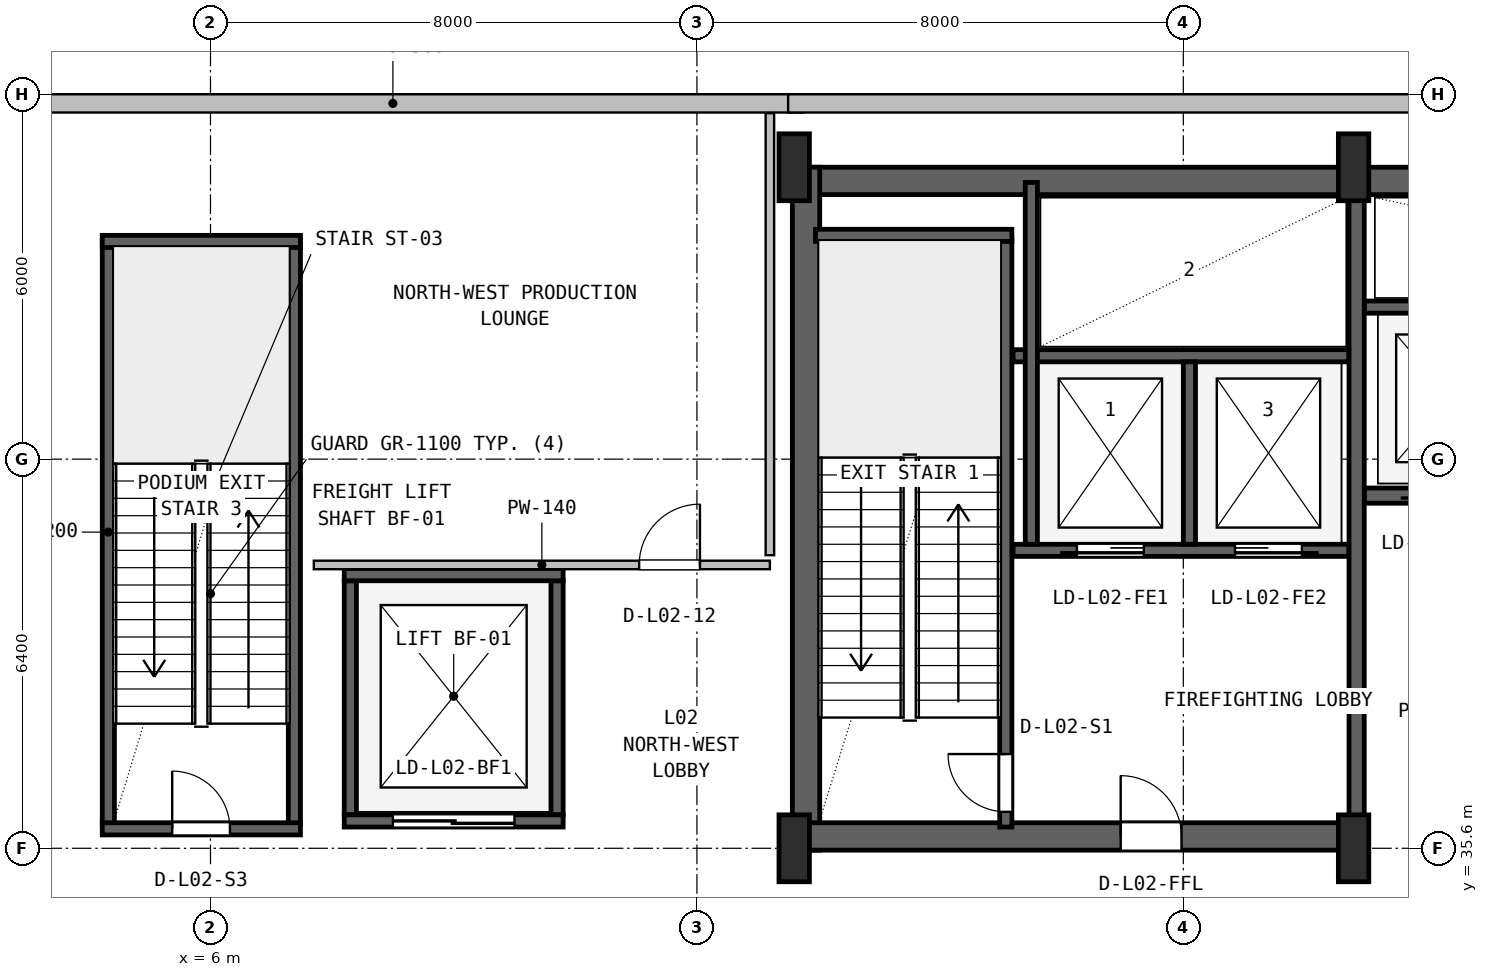
"""IFC4 building model, lengths in metres.
Left out: names, types, materials, properties, quantities, classifications, styles, units other than length and angle.
Written with IfcOpenShell. Run it as: python <this file> out.ifc"""

import sys

from ifc_helpers import new_model, si_unit, direction, frame, frame_2d, origin, origin_2d, place, context, subcontext, project, spatial, rectangle, i_section, extrude, source, transform, mapped, element, fill, save


model = new_model("IFC4")
c1 = context("Model", 3, precision=1e-05, world=origin(), true_north=direction((0.0, 1.0)))
c2 = subcontext(c1, "Body", "Model", "MODEL_VIEW")
j1 = project(units=[si_unit("LENGTHUNIT", "METRE"), si_unit("PLANEANGLEUNIT", "RADIAN")], contexts=[c1])
p1 = place(None, origin())
s1 = spatial("IfcSite", under=j1, at=p1, CompositionType="ELEMENT")
p2 = place(p1, origin())
s2 = spatial("IfcBuilding", under=s1, at=p2, CompositionType="ELEMENT")
p3 = place(p2, frame((0.0, 0.0, 11.4)))
s3 = spatial("IfcBuildingStorey", under=s2, at=p3, CompositionType="ELEMENT", Elevation=11.4)
p4 = place(p3, frame((15.6, 46.575, 0.0), z_axis=(0.0, 0.0, 1.0), x_axis=(1.0, 0.0, 0.0)))
e1 = element("IfcWall", 1, at=p4, inside=s3, PredefinedType="SHEAR", context=c2, shape_type="SweptSolid", body=[
    extrude(rectangle(XDim=36.8, YDim=0.45, at=frame_2d((18.4, 0.0))), origin(), (0.0, 0.0, 1.0), 5.12),
])
p5 = place(p3, frame((15.795, 35.57, 0.0), z_axis=(0.0, 0.0, 1.0), x_axis=(0.0, 1.0, 0.0)))
e2 = element("IfcWall", 2, at=p5, inside=s3, PredefinedType="SHEAR", context=c2, shape_type="SweptSolid", body=[
    extrude(rectangle(XDim=11.23, YDim=0.45, at=frame_2d((5.615, 0.0))), origin(), (0.0, 0.0, 1.0), 5.12),
])
p6 = place(p3, frame((15.57, 35.795, 0.0), z_axis=(0.0, 0.0, 1.0), x_axis=(1.0, 0.0, 0.0)))
e3 = element("IfcWall", 3, at=p6, inside=s3, PredefinedType="SHEAR", context=c2, shape_type="SweptSolid", body=[
    extrude(rectangle(XDim=9.23, YDim=0.45, at=frame_2d((4.615, 0.0))), origin(), (0.0, 0.0, 1.0), 5.12),
])
p7 = place(p6, frame((5.4, 0.0, 0.0)))
e4 = element("IfcOpeningElement", 4, at=p7, cuts=e3, PredefinedType="OPENING", context=c2, shape_type="SweptSolid", body=[
    extrude(rectangle(XDim=1.0, YDim=2.1, at=frame_2d((0.5, 1.05))), frame((0.0, 0.235, 0.0), z_axis=(0.0, -1.0, 0.0), x_axis=(1.0, 0.0, 0.0)), (0.0, 0.0, 1.0), 0.47),
])
m1 = source(origin(), c2, "Body", "SweptSolid", [
    extrude(i_section(OverallWidth=0.5, OverallDepth=1.1, WebThickness=0.018, FlangeThickness=0.032, FilletRadius=0.018, at=origin_2d()), origin(), (0.0, 0.0, 1.0), 5.4),
])
for number, where, z_axis, x_axis in (
    (5, (15.6, 35.6, 0.0), (0.0, 0.0, 1.0), (1.0, 0.0, 0.0)),
    (6, (15.6, 46.8, 0.0), (0.0, 0.0, 1.0), (1.0, 0.0, 0.0)),
    (7, (24.8, 35.6, 0.0), (0.0, 0.0, 1.0), (1.0, 0.0, 0.0)),
    (8, (24.8, 46.8, 0.0), (0.0, 0.0, 1.0), (1.0, 0.0, 0.0)),
):
    element("IfcColumn", number, at=place(p3, frame(where, z_axis=z_axis, x_axis=x_axis)), inside=s3, PredefinedType="COLUMN", context=c2, shape_type="MappedRepresentation", body=[
        mapped(m1, transform((0.0, 0.0, 0.0), x_axis=(1.0, 0.0, 0.0), y_axis=(0.0, 1.0, 0.0), z_axis=(0.0, 0.0, 1.0), scale=1.0)),
    ])
p8 = place(p3, frame((2.25, 47.85, 0.0), z_axis=(0.0, 0.0, 1.0), x_axis=(1.0, 0.0, 0.0)))
e9 = element("IfcWall", 9, at=p8, inside=s3, PredefinedType="SOLIDWALL", context=c2, shape_type="SweptSolid", body=[
    extrude(rectangle(XDim=13.5, YDim=0.3, at=frame_2d((6.75, 0.0))), origin(), (0.0, 0.0, 1.0), 5.1),
])
p9 = place(p3, frame((15.5, 47.85, 0.0), z_axis=(0.0, 0.0, 1.0), x_axis=(1.0, 0.0, 0.0)))
e10 = element("IfcWall", 10, at=p9, inside=s3, PredefinedType="SOLIDWALL", context=c2, shape_type="SweptSolid", body=[
    extrude(rectangle(XDim=37.0, YDim=0.3, at=frame_2d((18.5, 0.0))), origin(), (0.0, 0.0, 1.0), 5.1),
])
p10 = place(p3, frame((19.08, 35.95, 0.0), z_axis=(0.0, 0.0, 1.0), x_axis=(0.0, 1.0, 0.0)))
e11 = element("IfcWall", 11, at=p10, inside=s3, PredefinedType="SHEAR", context=c2, shape_type="SweptSolid", body=[
    extrude(rectangle(XDim=9.65, YDim=0.2, at=frame_2d((4.825, 0.0))), origin(), (0.0, 0.0, 1.0), 5.12),
])
p11 = place(p10, frame((0.25, 0.0, 0.0)))
e12 = element("IfcOpeningElement", 12, at=p11, cuts=e11, PredefinedType="OPENING", context=c2, shape_type="SweptSolid", body=[
    extrude(rectangle(XDim=0.95, YDim=2.1, at=frame_2d((0.475, 1.05))), frame((0.0, 0.11, 0.0), z_axis=(0.0, -1.0, 0.0), x_axis=(1.0, 0.0, 0.0)), (0.0, 0.0, 1.0), 0.22),
])
p12 = place(p3, frame((15.95, 45.68, 0.0), z_axis=(0.0, 0.0, 1.0), x_axis=(1.0, 0.0, 0.0)))
e13 = element("IfcWall", 13, at=p12, inside=s3, PredefinedType="SHEAR", context=c2, shape_type="SweptSolid", body=[
    extrude(rectangle(XDim=3.23, YDim=0.2, at=frame_2d((1.615, 0.0))), origin(), (0.0, 0.0, 1.0), 5.12),
])
p13 = place(p3, frame((24.85, 36.05, 0.0), z_axis=(0.0, 0.0, 1.0), x_axis=(0.0, 1.0, 0.0)))
e14 = element("IfcWall", 14, at=p13, inside=s3, PredefinedType="SHEAR", context=c2, shape_type="SweptSolid", body=[
    extrude(rectangle(XDim=10.45, YDim=0.25, at=frame_2d((5.225, 0.0))), origin(), (0.0, 0.0, 1.0), 5.12),
])
p14 = place(p3, frame((19.2, 40.5, 0.0), z_axis=(0.0, 0.0, 1.0), x_axis=(1.0, 0.0, 0.0)))
e15 = element("IfcWall", 15, at=p14, inside=s3, PredefinedType="SHEAR", context=c2, shape_type="SweptSolid", body=[
    extrude(rectangle(XDim=5.52, YDim=0.2, at=frame_2d((2.76, 0.0))), origin(), (0.0, 0.0, 1.0), 5.12),
])
p15 = place(p14, frame((1.05, 0.0, 0.0)))
e16 = element("IfcOpeningElement", 16, at=p15, cuts=e15, PredefinedType="OPENING", context=c2, shape_type="SweptSolid", body=[
    extrude(rectangle(XDim=1.1, YDim=2.18, at=frame_2d((0.55, 1.09))), frame((0.0, 0.11, 0.0), z_axis=(0.0, -1.0, 0.0), x_axis=(1.0, 0.0, 0.0)), (0.0, 0.0, 1.0), 0.22),
])
p16 = place(p14, frame((3.65, 0.0, 0.0)))
e17 = element("IfcOpeningElement", 17, at=p16, cuts=e15, PredefinedType="OPENING", context=c2, shape_type="SweptSolid", body=[
    extrude(rectangle(XDim=1.1, YDim=2.18, at=frame_2d((0.55, 1.09))), frame((0.0, 0.11, 0.0), z_axis=(0.0, -1.0, 0.0), x_axis=(1.0, 0.0, 0.0)), (0.0, 0.0, 1.0), 0.22),
])
p17 = place(p3, frame((19.2, 43.7, 0.0), z_axis=(0.0, 0.0, 1.0), x_axis=(1.0, 0.0, 0.0)))
e18 = element("IfcWall", 18, at=p17, inside=s3, PredefinedType="SHEAR", context=c2, shape_type="SweptSolid", body=[
    extrude(rectangle(XDim=5.52, YDim=0.2, at=frame_2d((2.76, 0.0))), origin(), (0.0, 0.0, 1.0), 5.12),
])
p18 = place(p3, frame((22.1, 40.6, 0.0), z_axis=(0.0, 0.0, 1.0), x_axis=(0.0, 1.0, 0.0)))
e19 = element("IfcWall", 19, at=p18, inside=s3, PredefinedType="SHEAR", context=c2, shape_type="SweptSolid", body=[
    extrude(rectangle(XDim=3.0, YDim=0.2, at=frame_2d((1.5, 0.0))), origin(), (0.0, 0.0, 1.0), 5.12),
])
p19 = place(p3, frame((19.5, 40.6, 0.0), z_axis=(0.0, 0.0, 1.0), x_axis=(0.0, 1.0, 0.0)))
e20 = element("IfcWall", 20, at=p19, inside=s3, PredefinedType="SHEAR", context=c2, shape_type="SweptSolid", body=[
    extrude(rectangle(XDim=5.95, YDim=0.2, at=frame_2d((2.975, 0.0))), origin(), (0.0, 0.0, 1.0), 5.12),
])
p20 = place(p3, frame((24.98, 41.4, 0.0), z_axis=(0.0, 0.0, 1.0), x_axis=(1.0, 0.0, 0.0)))
e21 = element("IfcWall", 21, at=p20, inside=s3, PredefinedType="SHEAR", context=c2, shape_type="SweptSolid", body=[
    extrude(rectangle(XDim=23.82, YDim=0.25, at=frame_2d((11.91, 0.0))), origin(), (0.0, 0.0, 1.0), 5.12),
])
p21 = place(p20, frame((0.87, 0.0, 0.0)))
e22 = element("IfcOpeningElement", 22, at=p21, cuts=e21, PredefinedType="OPENING", context=c2, shape_type="SweptSolid", body=[
    extrude(rectangle(XDim=1.1, YDim=2.18, at=frame_2d((0.55, 1.09))), frame((0.0, 0.135, 0.0), z_axis=(0.0, -1.0, 0.0), x_axis=(1.0, 0.0, 0.0)), (0.0, 0.0, 1.0), 0.27),
])
p22 = place(p20, frame((3.47, 0.0, 0.0)))
e23 = element("IfcOpeningElement", 23, at=p22, cuts=e21, PredefinedType="OPENING", context=c2, shape_type="SweptSolid", body=[
    extrude(rectangle(XDim=1.1, YDim=2.18, at=frame_2d((0.55, 1.09))), frame((0.0, 0.135, 0.0), z_axis=(0.0, -1.0, 0.0), x_axis=(1.0, 0.0, 0.0)), (0.0, 0.0, 1.0), 0.27),
])
p23 = place(p20, frame((6.07, 0.0, 0.0)))
e24 = element("IfcOpeningElement", 24, at=p23, cuts=e21, PredefinedType="OPENING", context=c2, shape_type="SweptSolid", body=[
    extrude(rectangle(XDim=1.1, YDim=2.18, at=frame_2d((0.55, 1.09))), frame((0.0, 0.135, 0.0), z_axis=(0.0, -1.0, 0.0), x_axis=(1.0, 0.0, 0.0)), (0.0, 0.0, 1.0), 0.27),
])
p24 = place(p3, frame((24.98, 44.5, 0.0), z_axis=(0.0, 0.0, 1.0), x_axis=(1.0, 0.0, 0.0)))
e25 = element("IfcWall", 25, at=p24, inside=s3, PredefinedType="SHEAR", context=c2, shape_type="SweptSolid", body=[
    extrude(rectangle(XDim=7.87, YDim=0.2, at=frame_2d((3.935, 0.0))), origin(), (0.0, 0.0, 1.0), 5.12),
])
for number, where, z_axis, x_axis in (
    (26, (4.32, 36.0, 0.0), (0.0, 0.0, 1.0), (0.0, 1.0, 0.0)),
    (27, (7.38, 36.0, 0.0), (0.0, 0.0, 1.0), (0.0, 1.0, 0.0)),
):
    element("IfcWall", number, at=place(p3, frame(where, z_axis=z_axis, x_axis=x_axis)), inside=s3, PredefinedType="SHEAR", context=c2, shape_type="SweptSolid", body=[
        extrude(rectangle(XDim=9.6, YDim=0.2, at=frame_2d((4.8, 0.0))), origin(), (0.0, 0.0, 1.0), 5.12),
    ])
p25 = place(p3, frame((4.22, 45.58, 0.0), z_axis=(0.0, 0.0, 1.0), x_axis=(1.0, 0.0, 0.0)))
e28 = element("IfcWall", 28, at=p25, inside=s3, PredefinedType="SHEAR", context=c2, shape_type="SweptSolid", body=[
    extrude(rectangle(XDim=3.26, YDim=0.2, at=frame_2d((1.63, 0.0))), origin(), (0.0, 0.0, 1.0), 5.12),
])
p26 = place(p3, frame((4.22, 35.92, 0.0), z_axis=(0.0, 0.0, 1.0), x_axis=(1.0, 0.0, 0.0)))
e29 = element("IfcWall", 29, at=p26, inside=s3, PredefinedType="SHEAR", context=c2, shape_type="SweptSolid", body=[
    extrude(rectangle(XDim=3.26, YDim=0.2, at=frame_2d((1.63, 0.0))), origin(), (0.0, 0.0, 1.0), 5.12),
])
p27 = place(p26, frame((1.15, 0.0, 0.0)))
e30 = element("IfcOpeningElement", 30, at=p27, cuts=e29, PredefinedType="OPENING", context=c2, shape_type="SweptSolid", body=[
    extrude(rectangle(XDim=0.95, YDim=2.1, at=frame_2d((0.475, 1.05))), frame((0.0, 0.11, 0.0), z_axis=(0.0, -1.0, 0.0), x_axis=(1.0, 0.0, 0.0)), (0.0, 0.0, 1.0), 0.22),
])
for number, where, z_axis, x_axis in (
    (31, (8.3, 36.15, 0.0), (0.0, 0.0, 1.0), (0.0, 1.0, 0.0)),
    (32, (11.7, 36.15, 0.0), (0.0, 0.0, 1.0), (0.0, 1.0, 0.0)),
):
    element("IfcWall", number, at=place(p3, frame(where, z_axis=z_axis, x_axis=x_axis)), inside=s3, PredefinedType="SHEAR", context=c2, shape_type="SweptSolid", body=[
        extrude(rectangle(XDim=3.85, YDim=0.2, at=frame_2d((1.925, 0.0))), origin(), (0.0, 0.0, 1.0), 5.12),
    ])
p28 = place(p3, frame((8.2, 40.1, 0.0), z_axis=(0.0, 0.0, 1.0), x_axis=(1.0, 0.0, 0.0)))
e33 = element("IfcWall", 33, at=p28, inside=s3, PredefinedType="SHEAR", context=c2, shape_type="SweptSolid", body=[
    extrude(rectangle(XDim=3.6, YDim=0.2, at=frame_2d((1.8, 0.0))), origin(), (0.0, 0.0, 1.0), 5.12),
])
p29 = place(p3, frame((8.2, 36.05, 0.0), z_axis=(0.0, 0.0, 1.0), x_axis=(1.0, 0.0, 0.0)))
e34 = element("IfcWall", 34, at=p29, inside=s3, PredefinedType="SHEAR", context=c2, shape_type="SweptSolid", body=[
    extrude(rectangle(XDim=3.6, YDim=0.2, at=frame_2d((1.8, 0.0))), origin(), (0.0, 0.0, 1.0), 5.12),
])
p30 = place(p29, frame((0.8, 0.0, 0.0)))
e35 = element("IfcOpeningElement", 35, at=p30, cuts=e34, PredefinedType="OPENING", context=c2, shape_type="SweptSolid", body=[
    extrude(rectangle(XDim=2.0, YDim=2.28, at=frame_2d((1.0, 1.14))), frame((0.0, 0.11, 0.0), z_axis=(0.0, -1.0, 0.0), x_axis=(1.0, 0.0, 0.0)), (0.0, 0.0, 1.0), 0.22),
])
p31 = place(p3, frame((7.7, 40.26, 0.0), z_axis=(0.0, 0.0, 1.0), x_axis=(1.0, 0.0, 0.0)))
e36 = element("IfcWall", 36, at=p31, inside=s3, PredefinedType="PARTITIONING", context=c2, shape_type="SweptSolid", body=[
    extrude(rectangle(XDim=7.5, YDim=0.14, at=frame_2d((3.75, 0.0))), origin(), (0.0, 0.0, 1.0), 5.1),
])
p32 = place(p31, frame((5.35, 0.0, 0.0)))
e37 = element("IfcOpeningElement", 37, at=p32, cuts=e36, PredefinedType="OPENING", context=c2, shape_type="SweptSolid", body=[
    extrude(rectangle(XDim=1.0, YDim=2.1, at=frame_2d((0.5, 1.05))), frame((0.0, 0.08, 0.0), z_axis=(0.0, -1.0, 0.0), x_axis=(1.0, 0.0, 0.0)), (0.0, 0.0, 1.0), 0.16),
])
p33 = place(p3, frame((15.2, 40.42, 0.0), z_axis=(0.0, 0.0, 1.0), x_axis=(0.0, 1.0, 0.0)))
e38 = element("IfcWall", 38, at=p33, inside=s3, PredefinedType="PARTITIONING", context=c2, shape_type="SweptSolid", body=[
    extrude(rectangle(XDim=7.27, YDim=0.14, at=frame_2d((3.635, 0.0))), origin(), (0.0, 0.0, 1.0), 4.183),
])
m2 = source(origin(), c2, "Body", "SweptSolid", [
    extrude(rectangle(XDim=0.95, YDim=2.1, at=frame_2d((0.475, 1.05))), frame((0.0, 0.025, 0.0), z_axis=(0.0, -1.0, 0.0), x_axis=(1.0, 0.0, 0.0)), (0.0, 0.0, 1.0), 0.05),
])
p34 = place(p11, origin())
e39 = element("IfcDoor", 39, at=p34, inside=s3, OperationType="SINGLE_SWING_RIGHT", PredefinedType="DOOR", context=c2, shape_type="MappedRepresentation", body=[
    mapped(m2, transform((0.0, 0.0, 0.0), x_axis=(1.0, 0.0, 0.0), y_axis=(0.0, 1.0, 0.0), z_axis=(0.0, 0.0, 1.0), scale=1.0)),
])
fill(e12, e39)
m3 = source(origin(), c2, "Body", "SweptSolid", [
    extrude(rectangle(XDim=1.0, YDim=2.1, at=frame_2d((0.5, 1.05))), frame((0.0, 0.025, 0.0), z_axis=(0.0, -1.0, 0.0), x_axis=(1.0, 0.0, 0.0)), (0.0, 0.0, 1.0), 0.05),
])
p35 = place(p7, origin())
e40 = element("IfcDoor", 40, at=p35, inside=s3, OperationType="SINGLE_SWING_LEFT", PredefinedType="DOOR", context=c2, shape_type="MappedRepresentation", body=[
    mapped(m3, transform((0.0, 0.0, 0.0), x_axis=(1.0, 0.0, 0.0), y_axis=(0.0, 1.0, 0.0), z_axis=(0.0, 0.0, 1.0), scale=1.0)),
])
fill(e4, e40)
m4 = source(origin(), c2, "Body", "SweptSolid", [
    extrude(rectangle(XDim=1.1, YDim=2.18, at=frame_2d((0.55, 1.09))), frame((0.0, 0.025, 0.0), z_axis=(0.0, -1.0, 0.0), x_axis=(1.0, 0.0, 0.0)), (0.0, 0.0, 1.0), 0.05),
])
p36 = place(p15, frame((1.1, 0.0, 0.0), z_axis=(0.0, 0.0, 1.0), x_axis=(-1.0, 0.0, 0.0)))
e41 = element("IfcDoor", 41, at=p36, inside=s3, OperationType="SLIDING_TO_LEFT", PredefinedType="DOOR", context=c2, shape_type="MappedRepresentation", body=[
    mapped(m4, transform((0.0, 0.0, 0.0), x_axis=(1.0, 0.0, 0.0), y_axis=(0.0, 1.0, 0.0), z_axis=(0.0, 0.0, 1.0), scale=1.0)),
])
fill(e16, e41)
p37 = place(p16, frame((1.1, 0.0, 0.0), z_axis=(0.0, 0.0, 1.0), x_axis=(-1.0, 0.0, 0.0)))
e42 = element("IfcDoor", 42, at=p37, inside=s3, OperationType="SLIDING_TO_RIGHT", PredefinedType="DOOR", context=c2, shape_type="MappedRepresentation", body=[
    mapped(m4, transform((0.0, 0.0, 0.0), x_axis=(1.0, 0.0, 0.0), y_axis=(0.0, 1.0, 0.0), z_axis=(0.0, 0.0, 1.0), scale=1.0)),
])
fill(e17, e42)
p38 = place(p27, origin())
e43 = element("IfcDoor", 43, at=p38, inside=s3, OperationType="SINGLE_SWING_LEFT", PredefinedType="DOOR", context=c2, shape_type="MappedRepresentation", body=[
    mapped(m2, transform((0.0, 0.0, 0.0), x_axis=(1.0, 0.0, 0.0), y_axis=(0.0, 1.0, 0.0), z_axis=(0.0, 0.0, 1.0), scale=1.0)),
])
fill(e30, e43)
m5 = source(origin(), c2, "Body", "SweptSolid", [
    extrude(rectangle(XDim=2.0, YDim=2.28, at=frame_2d((1.0, 1.14))), frame((0.0, 0.025, 0.0), z_axis=(0.0, -1.0, 0.0), x_axis=(1.0, 0.0, 0.0)), (0.0, 0.0, 1.0), 0.05),
])
p39 = place(p30, frame((2.0, 0.0, 0.0), z_axis=(0.0, 0.0, 1.0), x_axis=(-1.0, 0.0, 0.0)))
e44 = element("IfcDoor", 44, at=p39, inside=s3, OperationType="DOUBLE_DOOR_SLIDING", PredefinedType="DOOR", context=c2, shape_type="MappedRepresentation", body=[
    mapped(m5, transform((0.0, 0.0, 0.0), x_axis=(1.0, 0.0, 0.0), y_axis=(0.0, 1.0, 0.0), z_axis=(0.0, 0.0, 1.0), scale=1.0)),
])
fill(e35, e44)
m6 = source(origin(), c2, "Body", "SweptSolid", [
    extrude(rectangle(XDim=1.0, YDim=2.1, at=frame_2d((0.5, 1.05))), frame((0.0, 0.025, 0.0), z_axis=(0.0, -1.0, 0.0), x_axis=(1.0, 0.0, 0.0)), (0.0, 0.0, 1.0), 0.05),
])
p40 = place(p32, origin())
e45 = element("IfcDoor", 45, at=p40, inside=s3, OperationType="SINGLE_SWING_RIGHT", PredefinedType="DOOR", context=c2, shape_type="MappedRepresentation", body=[
    mapped(m6, transform((0.0, 0.0, 0.0), x_axis=(1.0, 0.0, 0.0), y_axis=(0.0, 1.0, 0.0), z_axis=(0.0, 0.0, 1.0), scale=1.0)),
])
fill(e37, e45)
save(model, sys.argv[1])
